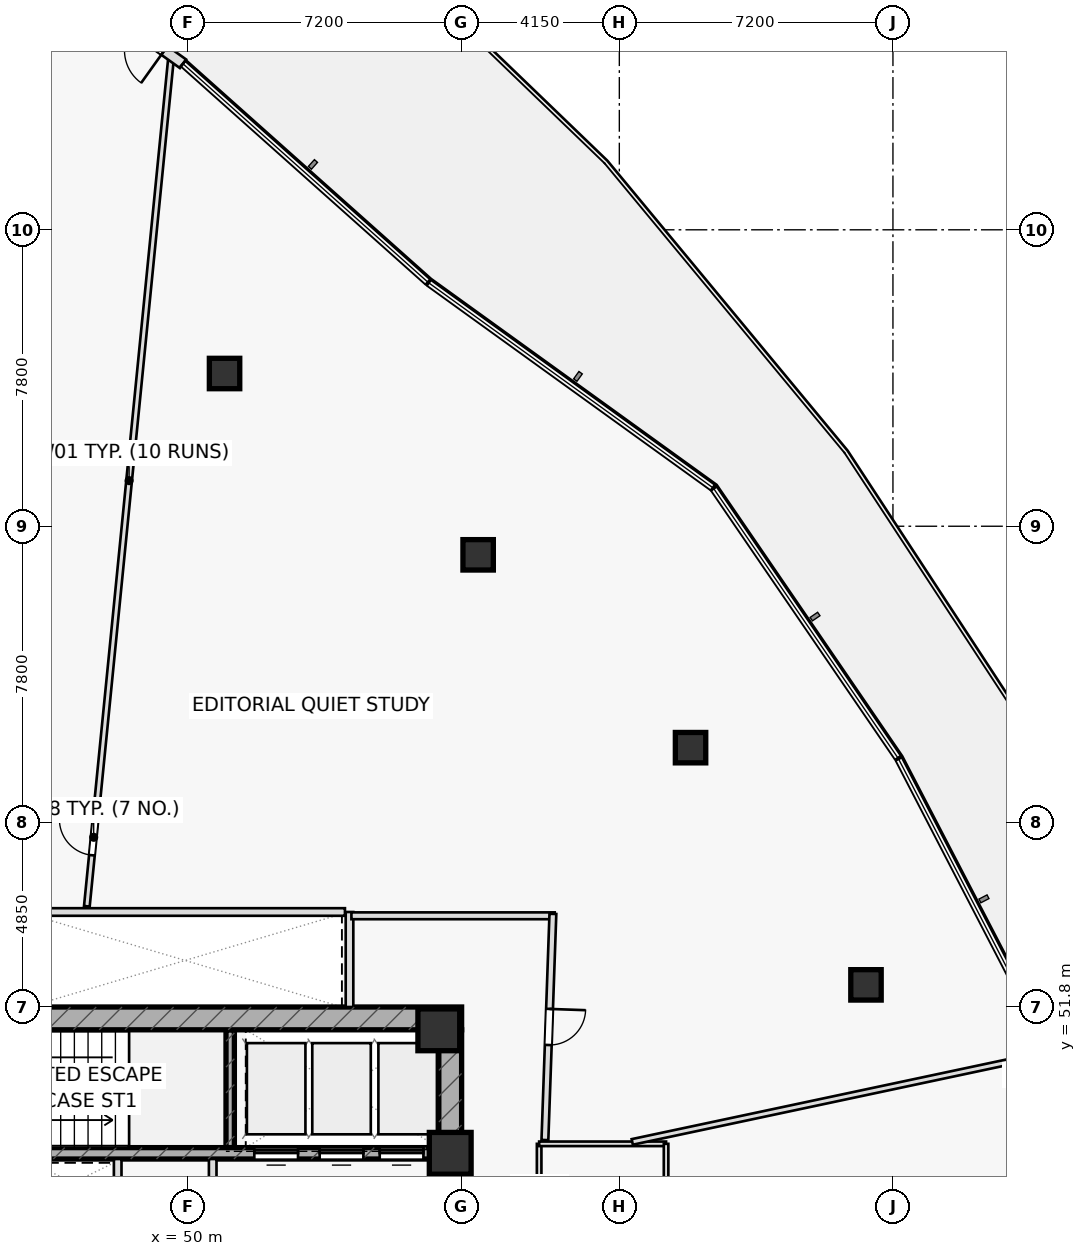
"""IFC4 building model, lengths in metres.
Left out: names, types, materials, properties, quantities, classifications, styles, units other than length and angle.
Written with IfcOpenShell. Run it as: python <this file> out.ifc"""

import sys

from ifc_helpers import new_model, si_unit, direction, frame, frame_2d, origin, origin_2d, place, context, subcontext, project, spatial, rectangle, hollow_rectangle, extrude, element, fill, save


model = new_model("IFC4")
c1 = context("Model", 3, precision=1e-05, world=origin(), true_north=direction((0.0, 1.0)))
c2 = subcontext(c1, "Body", "Model", "MODEL_VIEW")
j1 = project(units=[si_unit("LENGTHUNIT", "METRE"), si_unit("PLANEANGLEUNIT", "RADIAN")], contexts=[c1])
p1 = place(None, origin())
s1 = spatial("IfcSite", under=j1, at=p1, CompositionType="ELEMENT")
p2 = place(p1, origin())
s2 = spatial("IfcBuilding", under=s1, at=p2, CompositionType="ELEMENT")
p3 = place(p2, frame((0.0, 0.0, 27.6)))
s3 = spatial("IfcBuildingStorey", under=s2, at=p3, CompositionType="ELEMENT", Elevation=27.6)
p4 = place(p3, frame((51.11, 48.1, 0.0), z_axis=(0.0, 0.0, 1.0), x_axis=(0.0, 1.0, 0.0)))
e1 = element("IfcWall", 1, at=p4, inside=s3, PredefinedType="SHEAR", context=c2, shape_type="SweptSolid", body=[
    extrude(rectangle(XDim=3.1, YDim=0.22, at=frame_2d((1.55, 0.0))), origin(), (0.0, 0.0, 1.0), 3.6),
])
p5 = place(p3, frame((42.8, 51.5, 0.0), z_axis=(0.0, 0.0, 1.0), x_axis=(1.0, 0.0, 0.0)))
e2 = element("IfcWall", 2, at=p5, inside=s3, PredefinedType="SHEAR", context=c2, shape_type="SweptSolid", body=[
    extrude(rectangle(XDim=14.4, YDim=0.6, at=frame_2d((7.2, 0.0))), origin(), (0.0, 0.0, 1.0), 3.6),
])
p6 = place(p5, frame((0.88, 0.0, 0.0)))
e3 = element("IfcOpeningElement", 3, at=p6, cuts=e2, PredefinedType="OPENING", context=c2, shape_type="SweptSolid", body=[
    extrude(rectangle(XDim=1.05, YDim=2.2, at=frame_2d((0.525, 1.1))), frame((0.0, 0.31, 0.0), z_axis=(0.0, -1.0, 0.0), x_axis=(1.0, 0.0, 0.0)), (0.0, 0.0, 1.0), 0.62),
])
p7 = place(p3, frame((56.9, 38.8, 0.0), z_axis=(0.0, 0.0, 1.0), x_axis=(0.0, 1.0, 0.0)))
e4 = element("IfcWall", 4, at=p7, inside=s3, PredefinedType="SHEAR", context=c2, shape_type="SweptSolid", body=[
    extrude(rectangle(XDim=12.4, YDim=0.6, at=frame_2d((6.2, 0.0))), origin(), (0.0, 0.0, 1.0), 3.6),
])
p8 = place(p7, frame((3.85, 0.0, 0.0)))
e5 = element("IfcOpeningElement", 5, at=p8, cuts=e4, PredefinedType="OPENING", context=c2, shape_type="SweptSolid", body=[
    extrude(rectangle(XDim=1.5, YDim=2.2, at=frame_2d((0.75, 1.1))), frame((0.0, 0.31, 0.0), z_axis=(0.0, -1.0, 0.0), x_axis=(1.0, 0.0, 0.0)), (0.0, 0.0, 1.0), 0.62),
])
p9 = place(p3, frame((43.4, 47.95, 0.0), z_axis=(0.0, 0.0, 1.0), x_axis=(1.0, 0.0, 0.0)))
e6 = element("IfcWall", 6, at=p9, inside=s3, PredefinedType="SHEAR", context=c2, shape_type="SweptSolid", body=[
    extrude(rectangle(XDim=13.2, YDim=0.3, at=frame_2d((6.6, 0.0))), origin(), (0.0, 0.0, 1.0), 3.6),
])
p10 = place(p9, frame((8.345, 0.0, 0.0)))
e7 = element("IfcOpeningElement", 7, at=p10, cuts=e6, PredefinedType="OPENING", context=c2, shape_type="SweptSolid", body=[
    extrude(rectangle(XDim=1.15, YDim=2.2, at=frame_2d((0.575, 1.1))), frame((0.0, 0.16, 0.0), z_axis=(0.0, -1.0, 0.0), x_axis=(1.0, 0.0, 0.0)), (0.0, 0.0, 1.0), 0.32),
])
p11 = place(p9, frame((10.065, 0.0, 0.0)))
e8 = element("IfcOpeningElement", 8, at=p11, cuts=e6, PredefinedType="OPENING", context=c2, shape_type="SweptSolid", body=[
    extrude(rectangle(XDim=1.15, YDim=2.2, at=frame_2d((0.575, 1.1))), frame((0.0, 0.16, 0.0), z_axis=(0.0, -1.0, 0.0), x_axis=(1.0, 0.0, 0.0)), (0.0, 0.0, 1.0), 0.32),
])
p12 = place(p9, frame((11.645, 0.0, 0.0)))
e9 = element("IfcOpeningElement", 9, at=p12, cuts=e6, PredefinedType="OPENING", context=c2, shape_type="SweptSolid", body=[
    extrude(rectangle(XDim=1.15, YDim=2.2, at=frame_2d((0.575, 1.1))), frame((0.0, 0.16, 0.0), z_axis=(0.0, -1.0, 0.0), x_axis=(1.0, 0.0, 0.0)), (0.0, 0.0, 1.0), 0.32),
])
for number, where, z_axis, x_axis in (
    (10, (56.9, 47.95, 0.0), (0.0, 0.0, 1.0), (1.0, 0.0, 0.0)),
    (11, (56.6, 51.2, 0.0), (0.0, 0.0, 1.0), (1.0, 0.0, 0.0)),
):
    element("IfcColumn", number, at=place(p3, frame(where, z_axis=z_axis, x_axis=x_axis)), inside=s3, PredefinedType="COLUMN", context=c2, shape_type="SweptSolid", body=[
        extrude(rectangle(XDim=1.1, YDim=1.1, at=origin_2d()), origin(), (0.0, 0.0, 1.0), 3.6),
    ])
for number, where, z_axis, x_axis in (
    (12, (67.841, 52.383, 0.0), (0.0, 0.0, 1.0), (1.0, 0.0, 0.0)),
    (13, (63.224, 58.624, 0.0), (0.0, 0.0, 1.0), (1.0, 0.0, 0.0)),
    (14, (57.635, 63.698, 0.0), (0.0, 0.0, 1.0), (1.0, 0.0, 0.0)),
    (15, (50.962, 68.469, 0.0), (0.0, 0.0, 1.0), (1.0, 0.0, 0.0)),
):
    element("IfcColumn", number, at=place(p3, frame(where, z_axis=z_axis, x_axis=x_axis)), inside=s3, PredefinedType="COLUMN", context=c2, shape_type="SweptSolid", body=[
        extrude(hollow_rectangle(XDim=0.8, YDim=0.8, WallThickness=0.045, at=origin_2d()), origin(), (0.0, 0.0, 1.0), 3.6),
    ])
p13 = place(p3, frame((54.25, 51.8, 0.0), z_axis=(0.0, 0.0, 1.0), x_axis=(0.0, 1.0, 0.0)))
e16 = element("IfcWall", 16, at=p13, inside=s3, PredefinedType="PARTITIONING", context=c2, shape_type="SweptSolid", body=[
    extrude(rectangle(XDim=2.5, YDim=0.2, at=frame_2d((1.25, 0.0))), origin(), (0.0, 0.0, 1.0), 3.6),
])
p14 = place(p3, frame((48.15, 46.55, 0.0), z_axis=(0.0, 0.0, 1.0), x_axis=(0.0, 1.0, 0.0)))
e17 = element("IfcWall", 17, at=p14, inside=s3, PredefinedType="PARTITIONING", context=c2, shape_type="SweptSolid", body=[
    extrude(rectangle(XDim=1.25, YDim=0.2, at=frame_2d((0.625, 0.0))), origin(), (0.0, 0.0, 1.0), 3.6),
])
p15 = place(p3, frame((50.65, 45.05, 0.0), z_axis=(0.0, 0.0, 1.0), x_axis=(0.0, 1.0, 0.0)))
e18 = element("IfcWall", 18, at=p15, inside=s3, PredefinedType="PARTITIONING", context=c2, shape_type="SweptSolid", body=[
    extrude(rectangle(XDim=2.75, YDim=0.2, at=frame_2d((1.375, 0.0))), origin(), (0.0, 0.0, 1.0), 3.6),
])
p16 = place(p3, frame((59.24, 41.2, 0.0), z_axis=(0.0, 0.0, 1.0), x_axis=(0.0, 1.0, 0.0)))
e19 = element("IfcWall", 19, at=p16, inside=s3, PredefinedType="PARTITIONING", context=c2, shape_type="SweptSolid", body=[
    extrude(rectangle(XDim=7.0, YDim=0.12, at=frame_2d((3.5, 0.0))), origin(), (0.0, 0.0, 1.0), 3.6),
])
p17 = place(p16, frame((1.15, 0.0, 0.0)))
e20 = element("IfcOpeningElement", 20, at=p17, cuts=e19, PredefinedType="OPENING", context=c2, shape_type="SweptSolid", body=[
    extrude(rectangle(XDim=0.9, YDim=2.05, at=frame_2d((0.45, 1.025))), frame((0.0, 0.07, 0.0), z_axis=(0.0, -1.0, 0.0), x_axis=(1.0, 0.0, 0.0)), (0.0, 0.0, 1.0), 0.14),
])
p18 = place(p16, frame((4.7, 0.0, 0.0)))
e21 = element("IfcOpeningElement", 21, at=p18, cuts=e19, PredefinedType="OPENING", context=c2, shape_type="SweptSolid", body=[
    extrude(rectangle(XDim=0.9, YDim=2.05, at=frame_2d((0.45, 1.025))), frame((0.0, 0.07, 0.0), z_axis=(0.0, -1.0, 0.0), x_axis=(1.0, 0.0, 0.0)), (0.0, 0.0, 1.0), 0.14),
])
p19 = place(p3, frame((59.24, 48.2, 0.0), z_axis=(0.0, 0.0, 1.0), x_axis=(1.0, 0.0, 0.0)))
e22 = element("IfcWall", 22, at=p19, inside=s3, PredefinedType="PARTITIONING", context=c2, shape_type="SweptSolid", body=[
    extrude(rectangle(XDim=3.34, YDim=0.12, at=frame_2d((1.67, 0.0))), origin(), (0.0, 0.0, 1.0), 3.6),
])
p20 = place(p3, frame((62.58, 41.2, 0.0), z_axis=(0.0, 0.0, 1.0), x_axis=(0.0, 1.0, 0.0)))
e23 = element("IfcWall", 23, at=p20, inside=s3, PredefinedType="PARTITIONING", context=c2, shape_type="SweptSolid", body=[
    extrude(rectangle(XDim=7.0, YDim=0.12, at=frame_2d((3.5, 0.0))), origin(), (0.0, 0.0, 1.0), 3.6),
])
p21 = place(p3, frame((61.69, 48.25, 0.0), z_axis=(0.0, 0.0, 1.0), x_axis=(0.978145986239, 0.207919286276, 0.0)))
e24 = element("IfcWall", 24, at=p21, inside=s3, PredefinedType="PARTITIONING", context=c2, shape_type="SweptSolid", body=[
    extrude(rectangle(XDim=11.24, YDim=0.15, at=frame_2d((5.62, 0.0))), origin(), (0.0, 0.0, 1.0), 2.975),
])
p22 = place(p3, frame((47.338, 54.45, 0.0), z_axis=(0.0, 0.0, 1.0), x_axis=(0.098805694286, 0.995106745418, 0.0)))
e25 = element("IfcWall", 25, at=p22, inside=s3, PredefinedType="PARTITIONING", context=c2, shape_type="SweptSolid", body=[
    extrude(rectangle(XDim=22.51, YDim=0.15, at=frame_2d((11.255, 0.0))), origin(), (0.0, 0.0, 1.0), 2.975),
])
p23 = place(p22, frame((1.35, 0.0, 0.0)))
e26 = element("IfcOpeningElement", 26, at=p23, cuts=e25, PredefinedType="OPENING", context=c2, shape_type="SweptSolid", body=[
    extrude(rectangle(XDim=0.95, YDim=2.05, at=frame_2d((0.475, 1.025))), frame((0.0, 0.085, 0.0), z_axis=(0.0, -1.0, 0.0), x_axis=(1.0, 0.0, 0.0)), (0.0, 0.0, 1.0), 0.17),
])
p24 = place(p3, frame((54.3, 54.2, 0.0), z_axis=(0.0, 0.0, 1.0), x_axis=(1.0, 0.0, 0.0)))
e27 = element("IfcWall", 27, at=p24, inside=s3, PredefinedType="PARTITIONING", context=c2, shape_type="SweptSolid", body=[
    extrude(rectangle(XDim=5.35, YDim=0.18, at=frame_2d((2.675, 0.0))), origin(), (0.0, 0.0, 1.0), 2.925),
])
p25 = place(p3, frame((59.602, 54.25, 0.0), z_axis=(0.0, 0.0, 1.0), x_axis=(-0.035265891834, -0.999377964973, 0.0)))
e28 = element("IfcWall", 28, at=p25, inside=s3, PredefinedType="PARTITIONING", context=c2, shape_type="SweptSolid", body=[
    extrude(rectangle(XDim=5.954, YDim=0.18, at=frame_2d((2.977, 0.0))), origin(), (0.0, 0.0, 1.0), 2.925),
])
p26 = place(p25, frame((2.502, 0.0, 0.0)))
e29 = element("IfcOpeningElement", 29, at=p26, cuts=e28, PredefinedType="OPENING", context=c2, shape_type="SweptSolid", body=[
    extrude(rectangle(XDim=0.95, YDim=2.05, at=frame_2d((0.475, 1.025))), frame((0.0, 0.1, 0.0), z_axis=(0.0, -1.0, 0.0), x_axis=(1.0, 0.0, 0.0)), (0.0, 0.0, 1.0), 0.2),
])
p27 = place(p3, frame((49.868, 76.619, 0.0), z_axis=(0.0, 0.0, 1.0), x_axis=(-0.81360174319, 0.581422568772, 0.0)))
e30 = element("IfcWall", 30, at=p27, inside=s3, PredefinedType="STANDARD", context=c2, shape_type="SweptSolid", body=[
    extrude(rectangle(XDim=2.254, YDim=0.28, at=frame_2d((1.127, 0.0))), origin(), (0.0, 0.0, 1.0), 3.6),
])
p28 = place(p27, frame((0.602, 0.0, 0.0)))
e31 = element("IfcOpeningElement", 31, at=p28, cuts=e30, PredefinedType="OPENING", context=c2, shape_type="SweptSolid", body=[
    extrude(rectangle(XDim=1.05, YDim=2.2, at=frame_2d((0.525, 1.1))), frame((0.0, 0.15, 0.0), z_axis=(0.0, -1.0, 0.0), x_axis=(1.0, 0.0, 0.0)), (0.0, 0.0, 1.0), 0.3),
])
p29 = place(p3, frame((45.82, 54.3, 0.0), z_axis=(0.0, 0.0, 1.0), x_axis=(1.0, 0.0, 0.0)))
e32 = element("IfcWall", 32, at=p29, inside=s3, PredefinedType="PARTITIONING", context=c2, shape_type="SweptSolid", body=[
    extrude(rectangle(XDim=8.31, YDim=0.2, at=frame_2d((4.155, 0.0))), origin(), (0.0, 0.0, 1.0), 3.6),
])
p30 = place(p23, origin())
e33 = element("IfcDoor", 33, at=p30, inside=s3, OperationType="SINGLE_SWING_RIGHT", PredefinedType="DOOR", context=c2, shape_type="SweptSolid", body=[
    extrude(rectangle(XDim=0.95, YDim=2.05, at=frame_2d((0.475, 1.025))), frame((0.0, 0.025, 0.0), z_axis=(0.0, -1.0, 0.0), x_axis=(1.0, 0.0, 0.0)), (0.0, 0.0, 1.0), 0.05),
])
fill(e26, e33)
p31 = place(p26, origin())
e34 = element("IfcDoor", 34, at=p31, inside=s3, OperationType="SINGLE_SWING_LEFT", PredefinedType="DOOR", context=c2, shape_type="SweptSolid", body=[
    extrude(rectangle(XDim=0.95, YDim=2.05, at=frame_2d((0.475, 1.025))), frame((0.0, 0.025, 0.0), z_axis=(0.0, -1.0, 0.0), x_axis=(1.0, 0.0, 0.0)), (0.0, 0.0, 1.0), 0.05),
])
fill(e29, e34)
p32 = place(p10, origin())
e35 = element("IfcDoor", 35, at=p32, inside=s3, OperationType="SLIDING_TO_LEFT", PredefinedType="DOOR", context=c2, shape_type="SweptSolid", body=[
    extrude(rectangle(XDim=1.15, YDim=2.2, at=frame_2d((0.575, 1.1))), frame((0.0, 0.025, 0.0), z_axis=(0.0, -1.0, 0.0), x_axis=(1.0, 0.0, 0.0)), (0.0, 0.0, 1.0), 0.05),
])
fill(e7, e35)
p33 = place(p11, origin())
e36 = element("IfcDoor", 36, at=p33, inside=s3, OperationType="SLIDING_TO_LEFT", PredefinedType="DOOR", context=c2, shape_type="SweptSolid", body=[
    extrude(rectangle(XDim=1.15, YDim=2.2, at=frame_2d((0.575, 1.1))), frame((0.0, 0.025, 0.0), z_axis=(0.0, -1.0, 0.0), x_axis=(1.0, 0.0, 0.0)), (0.0, 0.0, 1.0), 0.05),
])
fill(e8, e36)
p34 = place(p12, origin())
e37 = element("IfcDoor", 37, at=p34, inside=s3, OperationType="SLIDING_TO_LEFT", PredefinedType="DOOR", context=c2, shape_type="SweptSolid", body=[
    extrude(rectangle(XDim=1.15, YDim=2.2, at=frame_2d((0.575, 1.1))), frame((0.0, 0.025, 0.0), z_axis=(0.0, -1.0, 0.0), x_axis=(1.0, 0.0, 0.0)), (0.0, 0.0, 1.0), 0.05),
])
fill(e9, e37)
save(model, sys.argv[1])
